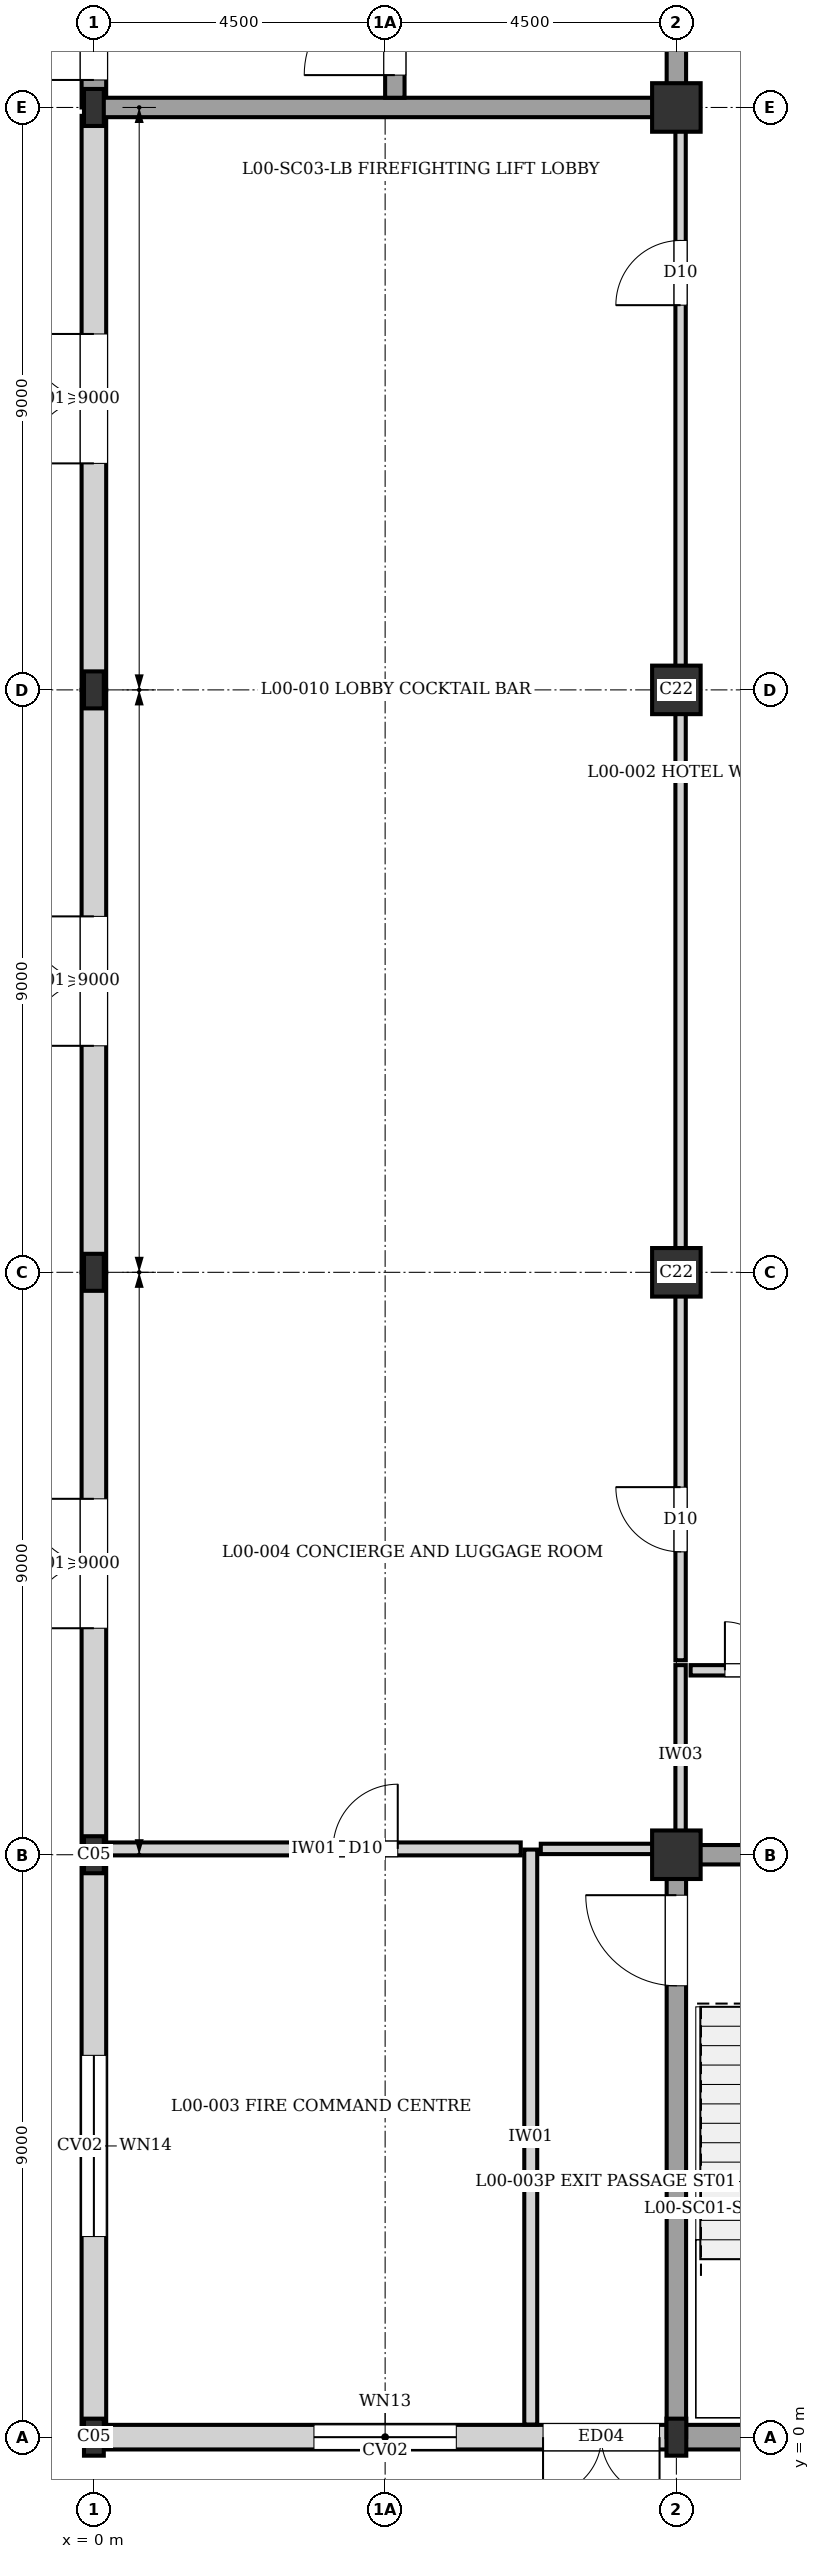
"""IFC4 building model, lengths in metres.
Left out: names, types, materials, properties, quantities, classifications, styles, units other than length and angle.
Written with IfcOpenShell. Run it as: python <this file> out.ifc"""

import sys

from ifc_helpers import new_model, si_unit, direction, frame, frame_2d, origin, origin_2d, place, context, subcontext, project, spatial, rectangle, i_section, extrude, element, fill, save


model = new_model("IFC4")
c1 = context("Model", 3, precision=1e-05, world=origin(), true_north=direction((0.0, 1.0)))
c2 = subcontext(c1, "Body", "Model", "MODEL_VIEW")
j1 = project(units=[si_unit("LENGTHUNIT", "METRE"), si_unit("PLANEANGLEUNIT", "RADIAN")], contexts=[c1])
p1 = place(None, origin())
s1 = spatial("IfcSite", under=j1, at=p1, CompositionType="ELEMENT")
p2 = place(p1, origin())
s2 = spatial("IfcBuilding", under=s1, at=p2, CompositionType="ELEMENT")
p3 = place(p2, origin())
s3 = spatial("IfcBuildingStorey", under=s2, at=p3, CompositionType="ELEMENT", Elevation=0.0)
for number, where, z_axis, x_axis in (
    (1, (0.0, 0.0, 0.0), (0.0, 0.0, 1.0), (1.0, 0.0, 0.0)),
    (2, (0.0, 9.0, 0.0), (0.0, 0.0, 1.0), (1.0, 0.0, 0.0)),
    (3, (0.0, 18.0, 0.0), (0.0, 0.0, 1.0), (1.0, 0.0, 0.0)),
    (4, (0.0, 27.0, 0.0), (0.0, 0.0, 1.0), (1.0, 0.0, 0.0)),
    (5, (0.0, 36.0, 0.0), (0.0, 0.0, 1.0), (1.0, 0.0, 0.0)),
    (6, (9.0, 0.0, 0.0), (0.0, 0.0, 1.0), (1.0, 0.0, 0.0)),
):
    element("IfcColumn", number, at=place(p3, frame(where, z_axis=z_axis, x_axis=x_axis)), inside=s3, PredefinedType="COLUMN", context=c2, shape_type="SweptSolid", body=[
        extrude(i_section(OverallWidth=0.306, OverallDepth=0.572, WebThickness=0.021, FlangeThickness=0.04, at=origin_2d()), origin(), (0.0, 0.0, 1.0), 4.32),
    ])
for number, where, z_axis, x_axis in (
    (7, (9.0, 9.0, 0.0), (0.0, 0.0, 1.0), (1.0, 0.0, 0.0)),
    (8, (9.0, 18.0, 0.0), (0.0, 0.0, 1.0), (1.0, 0.0, 0.0)),
    (9, (9.0, 27.0, 0.0), (0.0, 0.0, 1.0), (1.0, 0.0, 0.0)),
    (10, (9.0, 36.0, 0.0), (0.0, 0.0, 1.0), (1.0, 0.0, 0.0)),
):
    element("IfcColumn", number, at=place(p3, frame(where, z_axis=z_axis, x_axis=x_axis)), inside=s3, PredefinedType="COLUMN", context=c2, shape_type="SweptSolid", body=[
        extrude(rectangle(XDim=0.75, YDim=0.75, at=origin_2d()), origin(), (0.0, 0.0, 1.0), 4.32),
    ])
p4 = place(p3, frame((18.0, 0.0, 0.0), z_axis=(0.0, 0.0, 1.0), x_axis=(-1.0, 0.0, 0.0)))
e11 = element("IfcWall", 11, at=p4, inside=s3, PredefinedType="SOLIDWALL", context=c2, shape_type="SweptSolid", body=[
    extrude(rectangle(XDim=9.0, YDim=0.38, at=frame_2d((4.5, 0.0))), origin(), (0.0, 0.0, 1.0), 4.055),
])
p5 = place(p3, frame((8.87, 0.0, 0.0), z_axis=(0.0, 0.0, 1.0), x_axis=(-1.0, 0.0, 0.0)))
e12 = element("IfcWall", 12, at=p5, inside=s3, PredefinedType="SOLIDWALL", context=c2, shape_type="SweptSolid", body=[
    extrude(rectangle(XDim=8.87, YDim=0.38, at=frame_2d((4.435, 0.0))), origin(), (0.0, 0.0, 1.0), 3.695),
])
p6 = place(p5, frame((0.13, 0.0, 0.0)))
e13 = element("IfcOpeningElement", 13, at=p6, cuts=e12, PredefinedType="OPENING", context=c2, shape_type="SweptSolid", body=[
    extrude(rectangle(XDim=1.8, YDim=2.2, at=frame_2d((0.9, 1.1))), frame((0.0, 0.2, 0.0), z_axis=(0.0, -1.0, 0.0), x_axis=(1.0, 0.0, 0.0)), (0.0, 0.0, 1.0), 0.4),
])
p7 = place(p5, frame((3.27, 0.0, 0.4)))
e14 = element("IfcOpeningElement", 14, at=p7, cuts=e12, PredefinedType="OPENING", context=c2, shape_type="SweptSolid", body=[
    extrude(rectangle(XDim=2.2, YDim=1.8, at=frame_2d((1.1, 0.9))), frame((0.0, 0.2, 0.0), z_axis=(0.0, -1.0, 0.0), x_axis=(1.0, 0.0, 0.0)), (0.0, 0.0, 1.0), 0.4),
])
p8 = place(p3, frame((0.0, 0.155, 0.0), z_axis=(0.0, 0.0, 1.0), x_axis=(0.0, 1.0, 0.0)))
e15 = element("IfcWall", 15, at=p8, inside=s3, PredefinedType="SOLIDWALL", context=c2, shape_type="SweptSolid", body=[
    extrude(rectangle(XDim=8.845, YDim=0.38, at=frame_2d((4.422, 0.0))), origin(), (0.0, 0.0, 1.0), 3.655),
])
p9 = place(p8, frame((2.945, 0.0, 0.4)))
e16 = element("IfcOpeningElement", 16, at=p9, cuts=e15, PredefinedType="OPENING", context=c2, shape_type="SweptSolid", body=[
    extrude(rectangle(XDim=2.8, YDim=1.7, at=frame_2d((1.4, 0.85))), frame((0.0, 0.2, 0.0), z_axis=(0.0, -1.0, 0.0), x_axis=(1.0, 0.0, 0.0)), (0.0, 0.0, 1.0), 0.4),
])
p10 = place(p3, frame((0.0, 9.0, 0.0), z_axis=(0.0, 0.0, 1.0), x_axis=(0.0, 1.0, 0.0)))
e17 = element("IfcWall", 17, at=p10, inside=s3, PredefinedType="SOLIDWALL", context=c2, shape_type="SweptSolid", body=[
    extrude(rectangle(XDim=9.0, YDim=0.38, at=frame_2d((4.5, 0.0))), origin(), (0.0, 0.0, 1.0), 4.055),
])
p11 = place(p10, frame((3.5, 0.0, 0.0)))
e18 = element("IfcOpeningElement", 18, at=p11, cuts=e17, PredefinedType="OPENING", context=c2, shape_type="SweptSolid", body=[
    extrude(rectangle(XDim=2.0, YDim=2.4, at=frame_2d((1.0, 1.2))), frame((0.0, 0.2, 0.0), z_axis=(0.0, -1.0, 0.0), x_axis=(1.0, 0.0, 0.0)), (0.0, 0.0, 1.0), 0.4),
])
p12 = place(p3, frame((0.0, 18.0, 0.0), z_axis=(0.0, 0.0, 1.0), x_axis=(0.0, 1.0, 0.0)))
e19 = element("IfcWall", 19, at=p12, inside=s3, PredefinedType="SOLIDWALL", context=c2, shape_type="SweptSolid", body=[
    extrude(rectangle(XDim=9.0, YDim=0.38, at=frame_2d((4.5, 0.0))), origin(), (0.0, 0.0, 1.0), 3.755),
])
p13 = place(p12, frame((3.5, 0.0, 0.0)))
e20 = element("IfcOpeningElement", 20, at=p13, cuts=e19, PredefinedType="OPENING", context=c2, shape_type="SweptSolid", body=[
    extrude(rectangle(XDim=2.0, YDim=2.4, at=frame_2d((1.0, 1.2))), frame((0.0, 0.2, 0.0), z_axis=(0.0, -1.0, 0.0), x_axis=(1.0, 0.0, 0.0)), (0.0, 0.0, 1.0), 0.4),
])
p14 = place(p3, frame((0.0, 27.0, 0.0), z_axis=(0.0, 0.0, 1.0), x_axis=(0.0, 1.0, 0.0)))
e21 = element("IfcWall", 21, at=p14, inside=s3, PredefinedType="SOLIDWALL", context=c2, shape_type="SweptSolid", body=[
    extrude(rectangle(XDim=8.87, YDim=0.38, at=frame_2d((4.435, 0.0))), origin(), (0.0, 0.0, 1.0), 3.695),
])
p15 = place(p14, frame((3.5, 0.0, 0.0)))
e22 = element("IfcOpeningElement", 22, at=p15, cuts=e21, PredefinedType="OPENING", context=c2, shape_type="SweptSolid", body=[
    extrude(rectangle(XDim=2.0, YDim=2.4, at=frame_2d((1.0, 1.2))), frame((0.0, 0.2, 0.0), z_axis=(0.0, -1.0, 0.0), x_axis=(1.0, 0.0, 0.0)), (0.0, 0.0, 1.0), 0.4),
])
p16 = place(p3, frame((0.0, 36.0, 0.0), z_axis=(0.0, 0.0, 1.0), x_axis=(0.0, 1.0, 0.0)))
e23 = element("IfcWall", 23, at=p16, inside=s3, PredefinedType="SOLIDWALL", context=c2, shape_type="SweptSolid", body=[
    extrude(rectangle(XDim=9.0, YDim=0.38, at=frame_2d((4.5, 0.0))), origin(), (0.0, 0.0, 1.0), 4.055),
])
p17 = place(p16, frame((0.425, 0.0, 0.0)))
e24 = element("IfcOpeningElement", 24, at=p17, cuts=e23, PredefinedType="OPENING", context=c2, shape_type="SweptSolid", body=[
    extrude(rectangle(XDim=1.8, YDim=2.2, at=frame_2d((0.9, 1.1))), frame((0.0, 0.2, 0.0), z_axis=(0.0, -1.0, 0.0), x_axis=(1.0, 0.0, 0.0)), (0.0, 0.0, 1.0), 0.4),
])
p18 = place(p3, frame((9.0, 9.0, 0.0), z_axis=(0.0, 0.0, 1.0), x_axis=(1.0, 0.0, 0.0)))
e25 = element("IfcWall", 25, at=p18, inside=s3, PredefinedType="SHEAR", context=c2, shape_type="SweptSolid", body=[
    extrude(rectangle(XDim=9.0, YDim=0.3, at=frame_2d((4.5, 0.0))), origin(), (0.0, 0.0, 1.0), 4.055),
])
p19 = place(p18, frame((5.95, 0.0, 0.0)))
e26 = element("IfcOpeningElement", 26, at=p19, cuts=e25, PredefinedType="OPENING", context=c2, shape_type="SweptSolid", body=[
    extrude(rectangle(XDim=1.6, YDim=2.1, at=frame_2d((0.8, 1.05))), frame((0.0, 0.16, 0.0), z_axis=(0.0, -1.0, 0.0), x_axis=(1.0, 0.0, 0.0)), (0.0, 0.0, 1.0), 0.32),
])
p20 = place(p3, frame((9.0, 0.0, 0.0), z_axis=(0.0, 0.0, 1.0), x_axis=(0.0, 1.0, 0.0)))
e27 = element("IfcWall", 27, at=p20, inside=s3, PredefinedType="SHEAR", context=c2, shape_type="SweptSolid", body=[
    extrude(rectangle(XDim=9.0, YDim=0.3, at=frame_2d((4.5, 0.0))), origin(), (0.0, 0.0, 1.0), 4.055),
])
p21 = place(p20, frame((6.975, 0.0, 0.0)))
e28 = element("IfcOpeningElement", 28, at=p21, cuts=e27, PredefinedType="OPENING", context=c2, shape_type="SweptSolid", body=[
    extrude(rectangle(XDim=1.4, YDim=2.02, at=frame_2d((0.7, 1.01))), frame((0.0, 0.16, 0.0), z_axis=(0.0, -1.0, 0.0), x_axis=(1.0, 0.0, 0.0)), (0.0, 0.0, 1.0), 0.32),
])
p22 = place(p3, frame((0.0, 36.0, 0.0), z_axis=(0.0, 0.0, 1.0), x_axis=(1.0, 0.0, 0.0)))
e29 = element("IfcWall", 29, at=p22, inside=s3, PredefinedType="SHEAR", context=c2, shape_type="SweptSolid", body=[
    extrude(rectangle(XDim=9.0, YDim=0.3, at=frame_2d((4.5, 0.0))), origin(), (0.0, 0.0, 1.0), 4.055),
])
p23 = place(p3, frame((9.0, 36.0, 0.0), z_axis=(0.0, 0.0, 1.0), x_axis=(0.0, 1.0, 0.0)))
e30 = element("IfcWall", 30, at=p23, inside=s3, PredefinedType="SHEAR", context=c2, shape_type="SweptSolid", body=[
    extrude(rectangle(XDim=9.0, YDim=0.3, at=frame_2d((4.5, 0.0))), origin(), (0.0, 0.0, 1.0), 4.055),
])
p24 = place(p23, frame((1.95, 0.0, 0.0)))
e31 = element("IfcOpeningElement", 31, at=p24, cuts=e30, PredefinedType="OPENING", context=c2, shape_type="SweptSolid", body=[
    extrude(rectangle(XDim=1.6, YDim=2.1, at=frame_2d((0.8, 1.05))), frame((0.0, 0.16, 0.0), z_axis=(0.0, -1.0, 0.0), x_axis=(1.0, 0.0, 0.0)), (0.0, 0.0, 1.0), 0.32),
])
p25 = place(p3, frame((4.65, 36.15, 0.0), z_axis=(0.0, 0.0, 1.0), x_axis=(0.0, 1.0, 0.0)))
e32 = element("IfcWall", 32, at=p25, inside=s3, PredefinedType="SHEAR", context=c2, shape_type="SweptSolid", body=[
    extrude(rectangle(XDim=8.7, YDim=0.3, at=frame_2d((4.35, 0.0))), origin(), (0.0, 0.0, 1.0), 4.055),
])
p26 = place(p25, frame((0.35, 0.0, 0.0)))
e33 = element("IfcOpeningElement", 33, at=p26, cuts=e32, PredefinedType="OPENING", context=c2, shape_type="SweptSolid", body=[
    extrude(rectangle(XDim=1.4, YDim=2.02, at=frame_2d((0.7, 1.01))), frame((0.0, 0.16, 0.0), z_axis=(0.0, -1.0, 0.0), x_axis=(1.0, 0.0, 0.0)), (0.0, 0.0, 1.0), 0.32),
])
p27 = place(p3, frame((9.065, 9.155, 0.0), z_axis=(0.0, 0.0, 1.0), x_axis=(0.0, 1.0, 0.0)))
e34 = element("IfcWall", 34, at=p27, inside=s3, PredefinedType="PARTITIONING", context=c2, shape_type="SweptSolid", body=[
    extrude(rectangle(XDim=2.775, YDim=0.16, at=frame_2d((1.387, 0.0))), origin(), (0.0, 0.0, 1.0), 3.565),
])
p28 = place(p3, frame((6.75, 0.195, 0.0), z_axis=(0.0, 0.0, 1.0), x_axis=(0.0, 1.0, 0.0)))
e35 = element("IfcWall", 35, at=p28, inside=s3, PredefinedType="PARTITIONING", context=c2, shape_type="SweptSolid", body=[
    extrude(rectangle(XDim=8.885, YDim=0.2, at=frame_2d((4.442, 0.0))), origin(), (0.0, 0.0, 1.0), 4.055),
])
p29 = place(p3, frame((6.905, 9.09, 0.0), z_axis=(0.0, 0.0, 1.0), x_axis=(1.0, 0.0, 0.0)))
e36 = element("IfcWall", 36, at=p29, inside=s3, PredefinedType="PARTITIONING", context=c2, shape_type="SweptSolid", body=[
    extrude(rectangle(XDim=2.005, YDim=0.16, at=frame_2d((1.002, 0.0))), origin(), (0.0, 0.0, 1.0), 3.555),
])
p30 = place(p3, frame((9.22, 11.85, 0.0), z_axis=(0.0, 0.0, 1.0), x_axis=(1.0, 0.0, 0.0)))
e37 = element("IfcWall", 37, at=p30, inside=s3, PredefinedType="PARTITIONING", context=c2, shape_type="SweptSolid", body=[
    extrude(rectangle(XDim=2.56, YDim=0.16, at=frame_2d((1.28, 0.0))), origin(), (0.0, 0.0, 1.0), 4.055),
])
p31 = place(p30, frame((0.53, 0.0, 0.0)))
e38 = element("IfcOpeningElement", 38, at=p31, cuts=e37, PredefinedType="OPENING", context=c2, shape_type="SweptSolid", body=[
    extrude(rectangle(XDim=1.5, YDim=2.1, at=frame_2d((0.75, 1.05))), frame((0.0, 0.09, 0.0), z_axis=(0.0, -1.0, 0.0), x_axis=(1.0, 0.0, 0.0)), (0.0, 0.0, 1.0), 0.18),
])
p32 = place(p3, frame((9.065, 12.005, 0.0), z_axis=(0.0, 0.0, 1.0), x_axis=(0.0, 1.0, 0.0)))
e39 = element("IfcWall", 39, at=p32, inside=s3, PredefinedType="PARTITIONING", context=c2, shape_type="SweptSolid", body=[
    extrude(rectangle(XDim=5.725, YDim=0.16, at=frame_2d((2.863, 0.0))), origin(), (0.0, 0.0, 1.0), 3.565),
])
p33 = place(p32, frame((1.676, 0.0, 0.0)))
e40 = element("IfcOpeningElement", 40, at=p33, cuts=e39, PredefinedType="OPENING", context=c2, shape_type="SweptSolid", body=[
    extrude(rectangle(XDim=1.0, YDim=2.1, at=frame_2d((0.5, 1.05))), frame((0.0, 0.09, 0.0), z_axis=(0.0, -1.0, 0.0), x_axis=(1.0, 0.0, 0.0)), (0.0, 0.0, 1.0), 0.18),
])
p34 = place(p3, frame((9.065, 18.07, 0.0), z_axis=(0.0, 0.0, 1.0), x_axis=(0.0, 1.0, 0.0)))
e41 = element("IfcWall", 41, at=p34, inside=s3, PredefinedType="PARTITIONING", context=c2, shape_type="SweptSolid", body=[
    extrude(rectangle(XDim=8.91, YDim=0.16, at=frame_2d((4.455, 0.0))), origin(), (0.0, 0.0, 1.0), 3.465),
])
p35 = place(p3, frame((0.195, 9.09, 0.0), z_axis=(0.0, 0.0, 1.0), x_axis=(1.0, 0.0, 0.0)))
e42 = element("IfcWall", 42, at=p35, inside=s3, PredefinedType="PARTITIONING", context=c2, shape_type="SweptSolid", body=[
    extrude(rectangle(XDim=6.4, YDim=0.2, at=frame_2d((3.2, 0.0))), origin(), (0.0, 0.0, 1.0), 3.555),
])
p36 = place(p35, frame((3.5, 0.0, 0.0)))
e43 = element("IfcOpeningElement", 43, at=p36, cuts=e42, PredefinedType="OPENING", context=c2, shape_type="SweptSolid", body=[
    extrude(rectangle(XDim=1.0, YDim=2.1, at=frame_2d((0.5, 1.05))), frame((0.0, 0.11, 0.0), z_axis=(0.0, -1.0, 0.0), x_axis=(1.0, 0.0, 0.0)), (0.0, 0.0, 1.0), 0.22),
])
p37 = place(p3, frame((9.065, 26.98, 0.0), z_axis=(0.0, 0.0, 1.0), x_axis=(0.0, 1.0, 0.0)))
e44 = element("IfcWall", 44, at=p37, inside=s3, PredefinedType="PARTITIONING", context=c2, shape_type="SweptSolid", body=[
    extrude(rectangle(XDim=8.865, YDim=0.16, at=frame_2d((4.433, 0.0))), origin(), (0.0, 0.0, 1.0), 3.365),
])
p38 = place(p37, frame((5.965, 0.0, 0.0)))
e45 = element("IfcOpeningElement", 45, at=p38, cuts=e44, PredefinedType="OPENING", context=c2, shape_type="SweptSolid", body=[
    extrude(rectangle(XDim=1.0, YDim=2.1, at=frame_2d((0.5, 1.05))), frame((0.0, 0.09, 0.0), z_axis=(0.0, -1.0, 0.0), x_axis=(1.0, 0.0, 0.0)), (0.0, 0.0, 1.0), 0.18),
])
p39 = place(p6, origin())
e46 = element("IfcDoor", 46, at=p39, inside=s3, OperationType="DOUBLE_DOOR_SINGLE_SWING", PredefinedType="DOOR", context=c2, shape_type="SweptSolid", body=[
    extrude(rectangle(XDim=1.8, YDim=2.2, at=frame_2d((0.9, 1.1))), frame((0.0, 0.025, 0.0), z_axis=(0.0, -1.0, 0.0), x_axis=(1.0, 0.0, 0.0)), (0.0, 0.0, 1.0), 0.05),
])
fill(e13, e46)
p40 = place(p7, origin())
e47 = element("IfcWindow", 47, at=p40, inside=s3, PartitioningType="SINGLE_PANEL", PredefinedType="WINDOW", context=c2, shape_type="SweptSolid", body=[
    extrude(rectangle(XDim=2.2, YDim=1.8, at=frame_2d((1.1, 0.9))), frame((0.0, 0.03, 0.0), z_axis=(0.0, -1.0, 0.0), x_axis=(1.0, 0.0, 0.0)), (0.0, 0.0, 1.0), 0.06),
])
fill(e14, e47)
p41 = place(p9, origin())
e48 = element("IfcWindow", 48, at=p41, inside=s3, PartitioningType="SINGLE_PANEL", PredefinedType="WINDOW", context=c2, shape_type="SweptSolid", body=[
    extrude(rectangle(XDim=2.8, YDim=1.7, at=frame_2d((1.4, 0.85))), frame((0.0, 0.03, 0.0), z_axis=(0.0, -1.0, 0.0), x_axis=(1.0, 0.0, 0.0)), (0.0, 0.0, 1.0), 0.06),
])
fill(e16, e48)
p42 = place(p11, origin())
e49 = element("IfcDoor", 49, at=p42, inside=s3, OperationType="DOUBLE_DOOR_SINGLE_SWING", PredefinedType="DOOR", context=c2, shape_type="SweptSolid", body=[
    extrude(rectangle(XDim=2.0, YDim=2.4, at=frame_2d((1.0, 1.2))), frame((0.0, 0.025, 0.0), z_axis=(0.0, -1.0, 0.0), x_axis=(1.0, 0.0, 0.0)), (0.0, 0.0, 1.0), 0.05),
])
fill(e18, e49)
p43 = place(p13, origin())
e50 = element("IfcDoor", 50, at=p43, inside=s3, OperationType="DOUBLE_DOOR_SINGLE_SWING", PredefinedType="DOOR", context=c2, shape_type="SweptSolid", body=[
    extrude(rectangle(XDim=2.0, YDim=2.4, at=frame_2d((1.0, 1.2))), frame((0.0, 0.025, 0.0), z_axis=(0.0, -1.0, 0.0), x_axis=(1.0, 0.0, 0.0)), (0.0, 0.0, 1.0), 0.05),
])
fill(e20, e50)
p44 = place(p15, origin())
e51 = element("IfcDoor", 51, at=p44, inside=s3, OperationType="DOUBLE_DOOR_SINGLE_SWING", PredefinedType="DOOR", context=c2, shape_type="SweptSolid", body=[
    extrude(rectangle(XDim=2.0, YDim=2.4, at=frame_2d((1.0, 1.2))), frame((0.0, 0.025, 0.0), z_axis=(0.0, -1.0, 0.0), x_axis=(1.0, 0.0, 0.0)), (0.0, 0.0, 1.0), 0.05),
])
fill(e22, e51)
p45 = place(p17, origin())
e52 = element("IfcDoor", 52, at=p45, inside=s3, OperationType="DOUBLE_DOOR_SINGLE_SWING", PredefinedType="DOOR", context=c2, shape_type="SweptSolid", body=[
    extrude(rectangle(XDim=1.8, YDim=2.2, at=frame_2d((0.9, 1.1))), frame((0.0, 0.025, 0.0), z_axis=(0.0, -1.0, 0.0), x_axis=(1.0, 0.0, 0.0)), (0.0, 0.0, 1.0), 0.05),
])
fill(e24, e52)
p46 = place(p21, origin())
e53 = element("IfcDoor", 53, at=p46, inside=s3, OperationType="SINGLE_SWING_RIGHT", PredefinedType="DOOR", context=c2, shape_type="SweptSolid", body=[
    extrude(rectangle(XDim=1.4, YDim=2.02, at=frame_2d((0.7, 1.01))), frame((0.0, 0.025, 0.0), z_axis=(0.0, -1.0, 0.0), x_axis=(1.0, 0.0, 0.0)), (0.0, 0.0, 1.0), 0.05),
])
fill(e28, e53)
p47 = place(p26, origin())
e54 = element("IfcDoor", 54, at=p47, inside=s3, OperationType="SINGLE_SWING_LEFT", PredefinedType="DOOR", context=c2, shape_type="SweptSolid", body=[
    extrude(rectangle(XDim=1.4, YDim=2.02, at=frame_2d((0.7, 1.01))), frame((0.0, 0.025, 0.0), z_axis=(0.0, -1.0, 0.0), x_axis=(1.0, 0.0, 0.0)), (0.0, 0.0, 1.0), 0.05),
])
fill(e33, e54)
p48 = place(p31, origin())
e55 = element("IfcDoor", 55, at=p48, inside=s3, OperationType="DOUBLE_DOOR_SINGLE_SWING", PredefinedType="DOOR", context=c2, shape_type="SweptSolid", body=[
    extrude(rectangle(XDim=1.5, YDim=2.1, at=frame_2d((0.75, 1.05))), frame((0.0, 0.025, 0.0), z_axis=(0.0, -1.0, 0.0), x_axis=(1.0, 0.0, 0.0)), (0.0, 0.0, 1.0), 0.05),
])
fill(e38, e55)
p49 = place(p33, origin())
e56 = element("IfcDoor", 56, at=p49, inside=s3, OperationType="SINGLE_SWING_RIGHT", PredefinedType="DOOR", context=c2, shape_type="SweptSolid", body=[
    extrude(rectangle(XDim=1.0, YDim=2.1, at=frame_2d((0.5, 1.05))), frame((0.0, 0.025, 0.0), z_axis=(0.0, -1.0, 0.0), x_axis=(1.0, 0.0, 0.0)), (0.0, 0.0, 1.0), 0.05),
])
fill(e40, e56)
p50 = place(p38, origin())
e57 = element("IfcDoor", 57, at=p50, inside=s3, OperationType="SINGLE_SWING_LEFT", PredefinedType="DOOR", context=c2, shape_type="SweptSolid", body=[
    extrude(rectangle(XDim=1.0, YDim=2.1, at=frame_2d((0.5, 1.05))), frame((0.0, 0.025, 0.0), z_axis=(0.0, -1.0, 0.0), x_axis=(1.0, 0.0, 0.0)), (0.0, 0.0, 1.0), 0.05),
])
fill(e45, e57)
p51 = place(p36, origin())
e58 = element("IfcDoor", 58, at=p51, inside=s3, OperationType="SINGLE_SWING_RIGHT", PredefinedType="DOOR", context=c2, shape_type="SweptSolid", body=[
    extrude(rectangle(XDim=1.0, YDim=2.1, at=frame_2d((0.5, 1.05))), frame((0.0, 0.025, 0.0), z_axis=(0.0, -1.0, 0.0), x_axis=(1.0, 0.0, 0.0)), (0.0, 0.0, 1.0), 0.05),
])
fill(e43, e58)
save(model, sys.argv[1])
